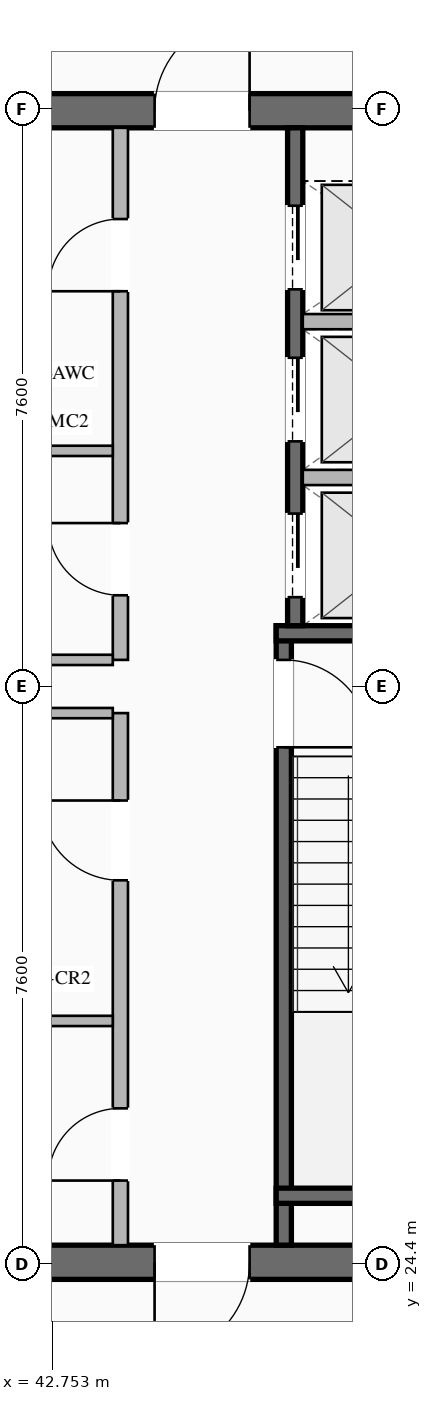
"""IFC4 building model, lengths in metres.
Left out: names, types, materials, properties, quantities, classifications, styles, units other than length and angle.
Written with IfcOpenShell. Run it as: python <this file> out.ifc"""

import sys

from ifc_helpers import new_model, si_unit, direction, frame, frame_2d, origin, place, context, subcontext, project, spatial, rectangle, extrude, element, fill, save


model = new_model("IFC4")
c1 = context("Model", 3, precision=1e-05, world=origin(), true_north=direction((0.0, 1.0)))
c2 = subcontext(c1, "Body", "Model", "MODEL_VIEW")
j1 = project(units=[si_unit("LENGTHUNIT", "METRE"), si_unit("PLANEANGLEUNIT", "RADIAN")], contexts=[c1])
p1 = place(None, origin())
s1 = spatial("IfcSite", under=j1, at=p1, CompositionType="ELEMENT")
p2 = place(p1, origin())
s2 = spatial("IfcBuilding", under=s1, at=p2, CompositionType="ELEMENT")
p3 = place(p2, frame((0.0, 0.0, 246.8)))
s3 = spatial("IfcBuildingStorey", under=s2, at=p3, CompositionType="ELEMENT", Elevation=246.8)
p4 = place(p3, frame((49.35, 24.425, 0.0), z_axis=(0.0, 0.0, 1.0), x_axis=(-1.0, 0.0, 0.0)))
e1 = element("IfcWall", 1, at=p4, inside=s3, PredefinedType="SHEAR", context=c2, shape_type="SweptSolid", body=[
    extrude(rectangle(XDim=14.7, YDim=0.45, at=frame_2d((7.35, 0.0))), origin(), (0.0, 0.0, 1.0), 4.6),
])
p5 = place(p4, frame((9.05, 0.0, 0.0)))
e2 = element("IfcOpeningElement", 2, at=p5, cuts=e1, PredefinedType="OPENING", context=c2, shape_type="SweptSolid", body=[
    extrude(rectangle(XDim=1.25, YDim=2.25, at=frame_2d((0.625, 1.125))), frame((0.0, 0.235, 0.0), z_axis=(0.0, -1.0, 0.0), x_axis=(1.0, 0.0, 0.0)), (0.0, 0.0, 1.0), 0.47),
])
p6 = place(p4, frame((4.0, 0.0, 0.0)))
e3 = element("IfcOpeningElement", 3, at=p6, cuts=e1, PredefinedType="OPENING", context=c2, shape_type="SweptSolid", body=[
    extrude(rectangle(XDim=1.25, YDim=2.25, at=frame_2d((0.625, 1.125))), frame((0.0, 0.235, 0.0), z_axis=(0.0, -1.0, 0.0), x_axis=(1.0, 0.0, 0.0)), (0.0, 0.0, 1.0), 0.47),
])
p7 = place(p3, frame((34.65, 39.575, 0.0), z_axis=(0.0, 0.0, 1.0), x_axis=(1.0, 0.0, 0.0)))
e4 = element("IfcWall", 4, at=p7, inside=s3, PredefinedType="SHEAR", context=c2, shape_type="SweptSolid", body=[
    extrude(rectangle(XDim=14.7, YDim=0.45, at=frame_2d((7.35, 0.0))), origin(), (0.0, 0.0, 1.0), 4.6),
])
p8 = place(p7, frame((4.4, 0.0, 0.0)))
e5 = element("IfcOpeningElement", 5, at=p8, cuts=e4, PredefinedType="OPENING", context=c2, shape_type="SweptSolid", body=[
    extrude(rectangle(XDim=1.25, YDim=2.25, at=frame_2d((0.625, 1.125))), frame((0.0, 0.235, 0.0), z_axis=(0.0, -1.0, 0.0), x_axis=(1.0, 0.0, 0.0)), (0.0, 0.0, 1.0), 0.47),
])
p9 = place(p7, frame((9.45, 0.0, 0.0)))
e6 = element("IfcOpeningElement", 6, at=p9, cuts=e4, PredefinedType="OPENING", context=c2, shape_type="SweptSolid", body=[
    extrude(rectangle(XDim=1.25, YDim=2.25, at=frame_2d((0.625, 1.125))), frame((0.0, 0.235, 0.0), z_axis=(0.0, -1.0, 0.0), x_axis=(1.0, 0.0, 0.0)), (0.0, 0.0, 1.0), 0.47),
])
p10 = place(p3, frame((45.8, 32.8, 0.0), z_axis=(0.0, 0.0, 1.0), x_axis=(0.0, -1.0, 0.0)))
e7 = element("IfcWall", 7, at=p10, inside=s3, PredefinedType="SHEAR", context=c2, shape_type="SweptSolid", body=[
    extrude(rectangle(XDim=8.15, YDim=0.2, at=frame_2d((4.075, 0.0))), origin(), (0.0, 0.0, 1.0), 4.38),
])
p11 = place(p10, frame((0.45, 0.0, 0.0)))
e8 = element("IfcOpeningElement", 8, at=p11, cuts=e7, PredefinedType="OPENING", context=c2, shape_type="SweptSolid", body=[
    extrude(rectangle(XDim=1.15, YDim=2.2, at=frame_2d((0.575, 1.1))), frame((0.0, 0.11, 0.0), z_axis=(0.0, -1.0, 0.0), x_axis=(1.0, 0.0, 0.0)), (0.0, 0.0, 1.0), 0.22),
])
for number, where, z_axis, x_axis in (
    (9, (45.7, 32.7, 0.0), (0.0, 0.0, 1.0), (1.0, 0.0, 0.0)),
    (10, (45.7, 25.3, 0.0), (0.0, 0.0, 1.0), (1.0, 0.0, 0.0)),
):
    element("IfcWall", number, at=place(p3, frame(where, z_axis=z_axis, x_axis=x_axis)), inside=s3, PredefinedType="SHEAR", context=c2, shape_type="SweptSolid", body=[
        extrude(rectangle(XDim=3.65, YDim=0.2, at=frame_2d((1.825, 0.0))), origin(), (0.0, 0.0, 1.0), 4.38),
    ])
p12 = place(p3, frame((45.95, 39.35, 0.0), z_axis=(0.0, 0.0, 1.0), x_axis=(0.0, -1.0, 0.0)))
e11 = element("IfcWall", 11, at=p12, inside=s3, PredefinedType="SHEAR", context=c2, shape_type="SweptSolid", body=[
    extrude(rectangle(XDim=6.55, YDim=0.2, at=frame_2d((3.275, 0.0))), origin(), (0.0, 0.0, 1.0), 4.38),
])
p13 = place(p12, frame((5.075, 0.0, 0.0)))
e12 = element("IfcOpeningElement", 12, at=p13, cuts=e11, PredefinedType="OPENING", context=c2, shape_type="SweptSolid", body=[
    extrude(rectangle(XDim=1.1, YDim=2.2, at=frame_2d((0.55, 1.1))), frame((0.0, 0.11, 0.0), z_axis=(0.0, -1.0, 0.0), x_axis=(1.0, 0.0, 0.0)), (0.0, 0.0, 1.0), 0.22),
])
p14 = place(p12, frame((3.025, 0.0, 0.0)))
e13 = element("IfcOpeningElement", 13, at=p14, cuts=e11, PredefinedType="OPENING", context=c2, shape_type="SweptSolid", body=[
    extrude(rectangle(XDim=1.1, YDim=2.2, at=frame_2d((0.55, 1.1))), frame((0.0, 0.11, 0.0), z_axis=(0.0, -1.0, 0.0), x_axis=(1.0, 0.0, 0.0)), (0.0, 0.0, 1.0), 0.22),
])
p15 = place(p12, frame((1.025, 0.0, 0.0)))
e14 = element("IfcOpeningElement", 14, at=p15, cuts=e11, PredefinedType="OPENING", context=c2, shape_type="SweptSolid", body=[
    extrude(rectangle(XDim=1.1, YDim=2.2, at=frame_2d((0.55, 1.1))), frame((0.0, 0.11, 0.0), z_axis=(0.0, -1.0, 0.0), x_axis=(1.0, 0.0, 0.0)), (0.0, 0.0, 1.0), 0.22),
])
for number, where, z_axis, x_axis in (
    (15, (46.05, 34.75, 0.0), (0.0, 0.0, 1.0), (1.0, 0.0, 0.0)),
    (16, (46.05, 36.8, 0.0), (0.0, 0.0, 1.0), (1.0, 0.0, 0.0)),
):
    element("IfcWall", number, at=place(p3, frame(where, z_axis=z_axis, x_axis=x_axis)), inside=s3, PredefinedType="SOLIDWALL", context=c2, shape_type="SweptSolid", body=[
        extrude(rectangle(XDim=3.3, YDim=0.2, at=frame_2d((1.65, 0.0))), origin(), (0.0, 0.0, 1.0), 4.38),
    ])
p16 = place(p3, frame((43.65, 24.65, 0.0), z_axis=(0.0, 0.0, 1.0), x_axis=(0.0, 1.0, 0.0)))
e17 = element("IfcWall", 17, at=p16, inside=s3, PredefinedType="SOLIDWALL", context=c2, shape_type="SweptSolid", body=[
    extrude(rectangle(XDim=7.0, YDim=0.2, at=frame_2d((3.5, 0.0))), origin(), (0.0, 0.0, 1.0), 3.491),
])
p17 = place(p16, frame((0.85, 0.0, 0.0)))
e18 = element("IfcOpeningElement", 18, at=p17, cuts=e17, PredefinedType="OPENING", context=c2, shape_type="SweptSolid", body=[
    extrude(rectangle(XDim=0.95, YDim=2.05, at=frame_2d((0.475, 1.025))), frame((0.0, 0.11, 0.0), z_axis=(0.0, -1.0, 0.0), x_axis=(1.0, 0.0, 0.0)), (0.0, 0.0, 1.0), 0.22),
])
p18 = place(p16, frame((4.8, 0.0, 0.0)))
e19 = element("IfcOpeningElement", 19, at=p18, cuts=e17, PredefinedType="OPENING", context=c2, shape_type="SweptSolid", body=[
    extrude(rectangle(XDim=1.05, YDim=2.2, at=frame_2d((0.525, 1.1))), frame((0.0, 0.11, 0.0), z_axis=(0.0, -1.0, 0.0), x_axis=(1.0, 0.0, 0.0)), (0.0, 0.0, 1.0), 0.22),
])
for number, where, z_axis, x_axis in (
    (20, (41.67, 31.65, 0.0), (0.0, 0.0, 1.0), (1.0, 0.0, 0.0)),
    (21, (41.67, 27.6, 0.0), (0.0, 0.0, 1.0), (1.0, 0.0, 0.0)),
):
    element("IfcWall", number, at=place(p3, frame(where, z_axis=z_axis, x_axis=x_axis)), inside=s3, PredefinedType="PARTITIONING", context=c2, shape_type="SweptSolid", body=[
        extrude(rectangle(XDim=1.88, YDim=0.135, at=frame_2d((0.94, 0.0))), origin(), (0.0, 0.0, 1.0), 3.491),
    ])
p19 = place(p3, frame((43.65, 32.35, 0.0), z_axis=(0.0, 0.0, 1.0), x_axis=(0.0, 1.0, 0.0)))
e22 = element("IfcWall", 22, at=p19, inside=s3, PredefinedType="SOLIDWALL", context=c2, shape_type="SweptSolid", body=[
    extrude(rectangle(XDim=7.0, YDim=0.2, at=frame_2d((3.5, 0.0))), origin(), (0.0, 0.0, 1.0), 3.491),
])
p20 = place(p19, frame((0.85, 0.0, 0.0)))
e23 = element("IfcOpeningElement", 23, at=p20, cuts=e22, PredefinedType="OPENING", context=c2, shape_type="SweptSolid", body=[
    extrude(rectangle(XDim=0.95, YDim=2.05, at=frame_2d((0.475, 1.025))), frame((0.0, 0.11, 0.0), z_axis=(0.0, -1.0, 0.0), x_axis=(1.0, 0.0, 0.0)), (0.0, 0.0, 1.0), 0.22),
])
p21 = place(p19, frame((4.85, 0.0, 0.0)))
e24 = element("IfcOpeningElement", 24, at=p21, cuts=e22, PredefinedType="OPENING", context=c2, shape_type="SweptSolid", body=[
    extrude(rectangle(XDim=0.95, YDim=2.05, at=frame_2d((0.475, 1.025))), frame((0.0, 0.11, 0.0), z_axis=(0.0, -1.0, 0.0), x_axis=(1.0, 0.0, 0.0)), (0.0, 0.0, 1.0), 0.22),
])
for number, where, z_axis, x_axis in (
    (25, (41.67, 32.35, 0.0), (0.0, 0.0, 1.0), (1.0, 0.0, 0.0)),
    (26, (41.67, 35.1, 0.0), (0.0, 0.0, 1.0), (1.0, 0.0, 0.0)),
):
    element("IfcWall", number, at=place(p3, frame(where, z_axis=z_axis, x_axis=x_axis)), inside=s3, PredefinedType="PARTITIONING", context=c2, shape_type="SweptSolid", body=[
        extrude(rectangle(XDim=1.88, YDim=0.135, at=frame_2d((0.94, 0.0))), origin(), (0.0, 0.0, 1.0), 3.491),
    ])
p22 = place(p9, origin())
e27 = element("IfcDoor", 27, at=p22, inside=s3, OperationType="SINGLE_SWING_RIGHT", PredefinedType="DOOR", context=c2, shape_type="SweptSolid", body=[
    extrude(rectangle(XDim=1.25, YDim=2.25, at=frame_2d((0.625, 1.125))), frame((0.0, 0.025, 0.0), z_axis=(0.0, -1.0, 0.0), x_axis=(1.0, 0.0, 0.0)), (0.0, 0.0, 1.0), 0.05),
])
fill(e6, e27)
p23 = place(p6, origin())
e28 = element("IfcDoor", 28, at=p23, inside=s3, OperationType="SINGLE_SWING_RIGHT", PredefinedType="DOOR", context=c2, shape_type="SweptSolid", body=[
    extrude(rectangle(XDim=1.25, YDim=2.25, at=frame_2d((0.625, 1.125))), frame((0.0, 0.025, 0.0), z_axis=(0.0, -1.0, 0.0), x_axis=(1.0, 0.0, 0.0)), (0.0, 0.0, 1.0), 0.05),
])
fill(e3, e28)
p24 = place(p11, origin())
e29 = element("IfcDoor", 29, at=p24, inside=s3, OperationType="SINGLE_SWING_RIGHT", PredefinedType="DOOR", context=c2, shape_type="SweptSolid", body=[
    extrude(rectangle(XDim=1.15, YDim=2.2, at=frame_2d((0.575, 1.1))), frame((0.0, 0.025, 0.0), z_axis=(0.0, -1.0, 0.0), x_axis=(1.0, 0.0, 0.0)), (0.0, 0.0, 1.0), 0.05),
])
fill(e8, e29)
p25 = place(p17, origin())
e30 = element("IfcDoor", 30, at=p25, inside=s3, OperationType="SINGLE_SWING_LEFT", PredefinedType="DOOR", context=c2, shape_type="SweptSolid", body=[
    extrude(rectangle(XDim=0.95, YDim=2.05, at=frame_2d((0.475, 1.025))), frame((0.0, 0.025, 0.0), z_axis=(0.0, -1.0, 0.0), x_axis=(1.0, 0.0, 0.0)), (0.0, 0.0, 1.0), 0.05),
])
fill(e18, e30)
p26 = place(p18, origin())
e31 = element("IfcDoor", 31, at=p26, inside=s3, OperationType="SINGLE_SWING_RIGHT", PredefinedType="DOOR", context=c2, shape_type="SweptSolid", body=[
    extrude(rectangle(XDim=1.05, YDim=2.2, at=frame_2d((0.525, 1.1))), frame((0.0, 0.025, 0.0), z_axis=(0.0, -1.0, 0.0), x_axis=(1.0, 0.0, 0.0)), (0.0, 0.0, 1.0), 0.05),
])
fill(e19, e31)
p27 = place(p20, origin())
e32 = element("IfcDoor", 32, at=p27, inside=s3, OperationType="SINGLE_SWING_RIGHT", PredefinedType="DOOR", context=c2, shape_type="SweptSolid", body=[
    extrude(rectangle(XDim=0.95, YDim=2.05, at=frame_2d((0.475, 1.025))), frame((0.0, 0.025, 0.0), z_axis=(0.0, -1.0, 0.0), x_axis=(1.0, 0.0, 0.0)), (0.0, 0.0, 1.0), 0.05),
])
fill(e23, e32)
p28 = place(p21, origin())
e33 = element("IfcDoor", 33, at=p28, inside=s3, OperationType="SINGLE_SWING_LEFT", PredefinedType="DOOR", context=c2, shape_type="SweptSolid", body=[
    extrude(rectangle(XDim=0.95, YDim=2.05, at=frame_2d((0.475, 1.025))), frame((0.0, 0.025, 0.0), z_axis=(0.0, -1.0, 0.0), x_axis=(1.0, 0.0, 0.0)), (0.0, 0.0, 1.0), 0.05),
])
fill(e24, e33)
p29 = place(p13, origin())
e34 = element("IfcDoor", 34, at=p29, inside=s3, OperationType="SLIDING_TO_LEFT", PredefinedType="DOOR", context=c2, shape_type="SweptSolid", body=[
    extrude(rectangle(XDim=1.1, YDim=2.2, at=frame_2d((0.55, 1.1))), frame((0.0, 0.025, 0.0), z_axis=(0.0, -1.0, 0.0), x_axis=(1.0, 0.0, 0.0)), (0.0, 0.0, 1.0), 0.05),
])
fill(e12, e34)
p30 = place(p14, origin())
e35 = element("IfcDoor", 35, at=p30, inside=s3, OperationType="SLIDING_TO_LEFT", PredefinedType="DOOR", context=c2, shape_type="SweptSolid", body=[
    extrude(rectangle(XDim=1.1, YDim=2.2, at=frame_2d((0.55, 1.1))), frame((0.0, 0.025, 0.0), z_axis=(0.0, -1.0, 0.0), x_axis=(1.0, 0.0, 0.0)), (0.0, 0.0, 1.0), 0.05),
])
fill(e13, e35)
p31 = place(p15, origin())
e36 = element("IfcDoor", 36, at=p31, inside=s3, OperationType="SLIDING_TO_LEFT", PredefinedType="DOOR", context=c2, shape_type="SweptSolid", body=[
    extrude(rectangle(XDim=1.1, YDim=2.2, at=frame_2d((0.55, 1.1))), frame((0.0, 0.025, 0.0), z_axis=(0.0, -1.0, 0.0), x_axis=(1.0, 0.0, 0.0)), (0.0, 0.0, 1.0), 0.05),
])
fill(e14, e36)
save(model, sys.argv[1])
